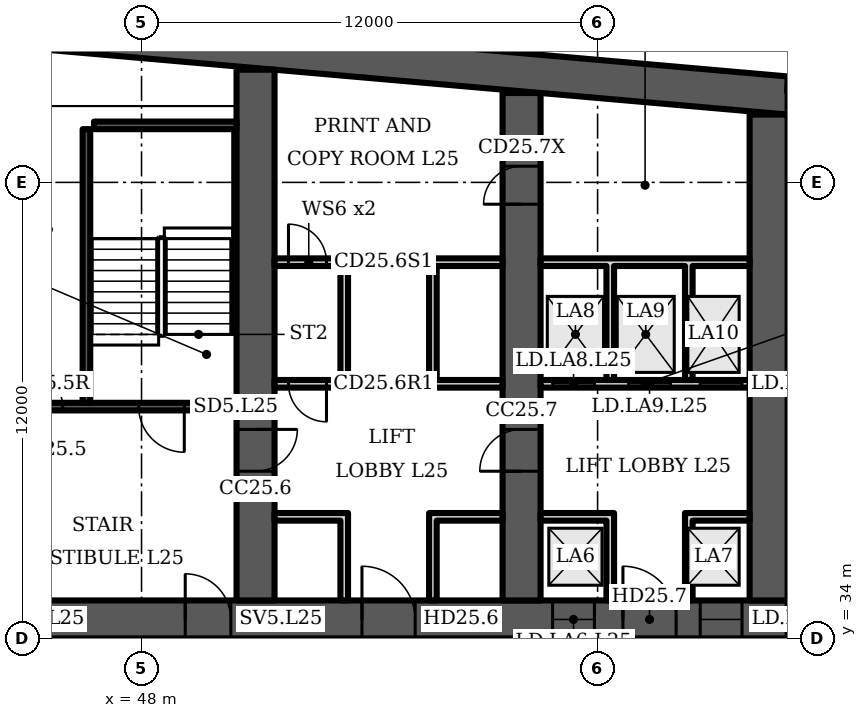
"""IFC4 building model, lengths in metres.
Left out: names, types, materials, properties, quantities, classifications, styles, units other than length and angle.
Written with IfcOpenShell. Run it as: python <this file> out.ifc"""

import sys

from ifc_helpers import new_model, si_unit, direction, frame, frame_2d, origin, place, context, subcontext, project, spatial, polyline, rectangle, outline, extrude, element, fill, save


model = new_model("IFC4")
c1 = context("Model", 3, precision=1e-05, world=origin(), true_north=direction((0.0, 1.0)))
c2 = subcontext(c1, "Body", "Model", "MODEL_VIEW")
j1 = project(units=[si_unit("LENGTHUNIT", "METRE"), si_unit("PLANEANGLEUNIT", "RADIAN")], contexts=[c1])
p1 = place(None, origin())
s1 = spatial("IfcSite", under=j1, at=p1, CompositionType="ELEMENT")
p2 = place(p1, origin())
s2 = spatial("IfcBuilding", under=s1, at=p2, CompositionType="ELEMENT")
p3 = place(p2, frame((0.0, 0.0, 111.1)))
s3 = spatial("IfcBuildingStorey", under=s2, at=p3, CompositionType="ELEMENT", Elevation=111.1)
p4 = place(p3, frame((0.0, 0.0, -0.0)))
e1 = element("IfcWall", 1, at=p4, inside=s3, PredefinedType="SHEAR", context=c2, shape_type="SweptSolid", body=[
    extrude(outline(polyline([(16.0, 47.784), (40.5, 49.927), (65.0, 47.784), (65.0, 48.787), (40.5, 50.931), (16.0, 48.787), (16.0, 47.784)])), origin(), (0.0, 0.0, 1.0), 3.6),
])
p5 = place(p3, frame((16.0, 34.5, 0.0), z_axis=(0.0, 0.0, 1.0), x_axis=(1.0, 0.0, 0.0)))
e2 = element("IfcWall", 2, at=p5, inside=s3, PredefinedType="SHEAR", context=c2, shape_type="SweptSolid", body=[
    extrude(rectangle(XDim=49.0, YDim=1.0, at=frame_2d((24.5, 0.0))), origin(), (0.0, 0.0, 1.0), 3.6),
])
p6 = place(p5, frame((1.2, 0.0, 0.0)))
e3 = element("IfcOpeningElement", 3, at=p6, cuts=e2, PredefinedType="OPENING", context=c2, shape_type="SweptSolid", body=[
    extrude(rectangle(XDim=1.1, YDim=2.1, at=frame_2d((0.55, 1.05))), frame((0.0, 0.51, 0.0), z_axis=(0.0, -1.0, 0.0), x_axis=(1.0, 0.0, 0.0)), (0.0, 0.0, 1.0), 1.02),
])
p7 = place(p5, frame((5.083, 0.0, 0.0)))
e4 = element("IfcOpeningElement", 4, at=p7, cuts=e2, PredefinedType="OPENING", context=c2, shape_type="SweptSolid", body=[
    extrude(rectangle(XDim=1.1, YDim=2.1, at=frame_2d((0.55, 1.05))), frame((0.0, 0.51, 0.0), z_axis=(0.0, -1.0, 0.0), x_axis=(1.0, 0.0, 0.0)), (0.0, 0.0, 1.0), 1.02),
])
p8 = place(p5, frame((2.933, 0.0, 0.0)))
e5 = element("IfcOpeningElement", 5, at=p8, cuts=e2, PredefinedType="OPENING", context=c2, shape_type="SweptSolid", body=[
    extrude(rectangle(XDim=1.4, YDim=2.1, at=frame_2d((0.7, 1.05))), frame((0.0, 0.51, 0.0), z_axis=(0.0, -1.0, 0.0), x_axis=(1.0, 0.0, 0.0)), (0.0, 0.0, 1.0), 1.02),
])
p9 = place(p5, frame((7.65, 0.0, 0.0)))
e6 = element("IfcOpeningElement", 6, at=p9, cuts=e2, PredefinedType="OPENING", context=c2, shape_type="SweptSolid", body=[
    extrude(rectangle(XDim=1.2, YDim=2.1, at=frame_2d((0.6, 1.05))), frame((0.0, 0.51, 0.0), z_axis=(0.0, -1.0, 0.0), x_axis=(1.0, 0.0, 0.0)), (0.0, 0.0, 1.0), 1.02),
])
p10 = place(p5, frame((14.817, 0.0, 0.0)))
e7 = element("IfcOpeningElement", 7, at=p10, cuts=e2, PredefinedType="OPENING", context=c2, shape_type="SweptSolid", body=[
    extrude(rectangle(XDim=1.1, YDim=2.1, at=frame_2d((0.55, 1.05))), frame((0.0, 0.51, 0.0), z_axis=(0.0, -1.0, 0.0), x_axis=(1.0, 0.0, 0.0)), (0.0, 0.0, 1.0), 1.02),
])
p11 = place(p5, frame((19.083, 0.0, 0.0)))
e8 = element("IfcOpeningElement", 8, at=p11, cuts=e2, PredefinedType="OPENING", context=c2, shape_type="SweptSolid", body=[
    extrude(rectangle(XDim=1.1, YDim=2.1, at=frame_2d((0.55, 1.05))), frame((0.0, 0.51, 0.0), z_axis=(0.0, -1.0, 0.0), x_axis=(1.0, 0.0, 0.0)), (0.0, 0.0, 1.0), 1.02),
])
p12 = place(p5, frame((16.8, 0.0, 0.0)))
e9 = element("IfcOpeningElement", 9, at=p12, cuts=e2, PredefinedType="OPENING", context=c2, shape_type="SweptSolid", body=[
    extrude(rectangle(XDim=1.4, YDim=2.1, at=frame_2d((0.7, 1.05))), frame((0.0, 0.51, 0.0), z_axis=(0.0, -1.0, 0.0), x_axis=(1.0, 0.0, 0.0)), (0.0, 0.0, 1.0), 1.02),
])
p13 = place(p5, frame((21.817, 0.0, 0.0)))
e10 = element("IfcOpeningElement", 10, at=p13, cuts=e2, PredefinedType="OPENING", context=c2, shape_type="SweptSolid", body=[
    extrude(rectangle(XDim=1.1, YDim=2.1, at=frame_2d((0.55, 1.05))), frame((0.0, 0.51, 0.0), z_axis=(0.0, -1.0, 0.0), x_axis=(1.0, 0.0, 0.0)), (0.0, 0.0, 1.0), 1.02),
])
p14 = place(p5, frame((26.083, 0.0, 0.0)))
e11 = element("IfcOpeningElement", 11, at=p14, cuts=e2, PredefinedType="OPENING", context=c2, shape_type="SweptSolid", body=[
    extrude(rectangle(XDim=1.1, YDim=2.1, at=frame_2d((0.55, 1.05))), frame((0.0, 0.51, 0.0), z_axis=(0.0, -1.0, 0.0), x_axis=(1.0, 0.0, 0.0)), (0.0, 0.0, 1.0), 1.02),
])
p15 = place(p5, frame((33.15, 0.0, 0.0)))
e12 = element("IfcOpeningElement", 12, at=p15, cuts=e2, PredefinedType="OPENING", context=c2, shape_type="SweptSolid", body=[
    extrude(rectangle(XDim=1.2, YDim=2.1, at=frame_2d((0.6, 1.05))), frame((0.0, 0.51, 0.0), z_axis=(0.0, -1.0, 0.0), x_axis=(1.0, 0.0, 0.0)), (0.0, 0.0, 1.0), 1.02),
])
p16 = place(p5, frame((37.8, 0.0, 0.0)))
e13 = element("IfcOpeningElement", 13, at=p16, cuts=e2, PredefinedType="OPENING", context=c2, shape_type="SweptSolid", body=[
    extrude(rectangle(XDim=1.4, YDim=2.1, at=frame_2d((0.7, 1.05))), frame((0.0, 0.51, 0.0), z_axis=(0.0, -1.0, 0.0), x_axis=(1.0, 0.0, 0.0)), (0.0, 0.0, 1.0), 1.02),
])
p17 = place(p5, frame((42.817, 0.0, 0.0)))
e14 = element("IfcOpeningElement", 14, at=p17, cuts=e2, PredefinedType="OPENING", context=c2, shape_type="SweptSolid", body=[
    extrude(rectangle(XDim=1.1, YDim=2.1, at=frame_2d((0.55, 1.05))), frame((0.0, 0.51, 0.0), z_axis=(0.0, -1.0, 0.0), x_axis=(1.0, 0.0, 0.0)), (0.0, 0.0, 1.0), 1.02),
])
p18 = place(p5, frame((46.7, 0.0, 0.0)))
e15 = element("IfcOpeningElement", 15, at=p18, cuts=e2, PredefinedType="OPENING", context=c2, shape_type="SweptSolid", body=[
    extrude(rectangle(XDim=1.1, YDim=2.1, at=frame_2d((0.55, 1.05))), frame((0.0, 0.51, 0.0), z_axis=(0.0, -1.0, 0.0), x_axis=(1.0, 0.0, 0.0)), (0.0, 0.0, 1.0), 1.02),
])
p19 = place(p5, frame((44.667, 0.0, 0.0)))
e16 = element("IfcOpeningElement", 16, at=p19, cuts=e2, PredefinedType="OPENING", context=c2, shape_type="SweptSolid", body=[
    extrude(rectangle(XDim=1.4, YDim=2.1, at=frame_2d((0.7, 1.05))), frame((0.0, 0.51, 0.0), z_axis=(0.0, -1.0, 0.0), x_axis=(1.0, 0.0, 0.0)), (0.0, 0.0, 1.0), 1.02),
])
p20 = place(p3, frame((51.0, 35.0, 0.0), z_axis=(0.0, 0.0, 1.0), x_axis=(0.0, 1.0, 0.0)))
e17 = element("IfcWall", 17, at=p20, inside=s3, PredefinedType="SHEAR", context=c2, shape_type="SweptSolid", body=[
    extrude(rectangle(XDim=13.965, YDim=1.0, at=frame_2d((6.982, 0.0))), origin(), (0.0, 0.0, 1.0), 3.6),
])
p21 = place(p20, frame((3.4, 0.0, 0.0)))
e18 = element("IfcOpeningElement", 18, at=p21, cuts=e17, PredefinedType="OPENING", context=c2, shape_type="SweptSolid", body=[
    extrude(rectangle(XDim=1.1, YDim=2.1, at=frame_2d((0.55, 1.05))), frame((0.0, 0.51, 0.0), z_axis=(0.0, -1.0, 0.0), x_axis=(1.0, 0.0, 0.0)), (0.0, 0.0, 1.0), 1.02),
])
p22 = place(p3, frame((58.0, 35.0, 0.0), z_axis=(0.0, 0.0, 1.0), x_axis=(0.0, 1.0, 0.0)))
e19 = element("IfcWall", 19, at=p22, inside=s3, PredefinedType="SHEAR", context=c2, shape_type="SweptSolid", body=[
    extrude(rectangle(XDim=13.352, YDim=1.0, at=frame_2d((6.676, 0.0))), origin(), (0.0, 0.0, 1.0), 3.6),
])
p23 = place(p22, frame((10.426, 0.0, 0.0)))
e20 = element("IfcOpeningElement", 20, at=p23, cuts=e19, PredefinedType="OPENING", context=c2, shape_type="SweptSolid", body=[
    extrude(rectangle(XDim=1.0, YDim=2.1, at=frame_2d((0.5, 1.05))), frame((0.0, 0.51, 0.0), z_axis=(0.0, -1.0, 0.0), x_axis=(1.0, 0.0, 0.0)), (0.0, 0.0, 1.0), 1.02),
])
p24 = place(p22, frame((3.4, 0.0, 0.0)))
e21 = element("IfcOpeningElement", 21, at=p24, cuts=e19, PredefinedType="OPENING", context=c2, shape_type="SweptSolid", body=[
    extrude(rectangle(XDim=1.1, YDim=2.1, at=frame_2d((0.55, 1.05))), frame((0.0, 0.51, 0.0), z_axis=(0.0, -1.0, 0.0), x_axis=(1.0, 0.0, 0.0)), (0.0, 0.0, 1.0), 1.02),
])
p25 = place(p3, frame((64.5, 35.0, 0.0), z_axis=(0.0, 0.0, 1.0), x_axis=(0.0, 1.0, 0.0)))
e22 = element("IfcWall", 22, at=p25, inside=s3, PredefinedType="SHEAR", context=c2, shape_type="SweptSolid", body=[
    extrude(rectangle(XDim=12.784, YDim=1.0, at=frame_2d((6.392, 0.0))), origin(), (0.0, 0.0, 1.0), 3.6),
])
p26 = place(p3, frame((67.983, 48.326, 0.0), z_axis=(0.0, 0.0, 1.0), x_axis=(-0.996194, 0.087168, 0.0)))
e23 = element("IfcWall", 23, at=p26, inside=s3, PredefinedType="SOLIDWALL", context=c2, shape_type="SweptSolid", body=[
    extrude(rectangle(XDim=2.994, YDim=0.4, at=frame_2d((1.497, 0.0))), origin(), (0.0, 0.0, 1.0), 3.2),
])
p27 = place(p3, frame((44.5, 40.1, 0.0), z_axis=(0.0, 0.0, 1.0), x_axis=(1.0, 0.0, 0.0)))
e24 = element("IfcWall", 24, at=p27, inside=s3, PredefinedType="SHEAR", context=c2, shape_type="SweptSolid", body=[
    extrude(rectangle(XDim=6.0, YDim=0.2, at=frame_2d((3.0, 0.0))), origin(), (0.0, 0.0, 1.0), 3.2),
])
p28 = place(p27, frame((3.425, 0.0, 0.0)))
e25 = element("IfcOpeningElement", 25, at=p28, cuts=e24, PredefinedType="OPENING", context=c2, shape_type="SweptSolid", body=[
    extrude(rectangle(XDim=1.2, YDim=2.1, at=frame_2d((0.6, 1.05))), frame((0.0, 0.11, 0.0), z_axis=(0.0, -1.0, 0.0), x_axis=(1.0, 0.0, 0.0)), (0.0, 0.0, 1.0), 0.22),
])
p29 = place(p27, frame((0.525, 0.0, 0.0)))
e26 = element("IfcOpeningElement", 26, at=p29, cuts=e24, PredefinedType="OPENING", context=c2, shape_type="SweptSolid", body=[
    extrude(rectangle(XDim=0.9, YDim=2.1, at=frame_2d((0.45, 1.05))), frame((0.0, 0.11, 0.0), z_axis=(0.0, -1.0, 0.0), x_axis=(1.0, 0.0, 0.0)), (0.0, 0.0, 1.0), 0.22),
])
p30 = place(p3, frame((46.55, 40.2, 0.0), z_axis=(0.0, 0.0, 1.0), x_axis=(0.0, 1.0, 0.0)))
e27 = element("IfcWall", 27, at=p30, inside=s3, PredefinedType="SHEAR", context=c2, shape_type="SweptSolid", body=[
    extrude(rectangle(XDim=7.2, YDim=0.2, at=frame_2d((3.6, 0.0))), origin(), (0.0, 0.0, 1.0), 3.2),
])
p31 = place(p3, frame((46.75, 47.5, 0.0), z_axis=(0.0, 0.0, 1.0), x_axis=(1.0, 0.0, 0.0)))
e28 = element("IfcWall", 28, at=p31, inside=s3, PredefinedType="SHEAR", context=c2, shape_type="SweptSolid", body=[
    extrude(rectangle(XDim=3.75, YDim=0.2, at=frame_2d((1.875, 0.0))), origin(), (0.0, 0.0, 1.0), 3.2),
])
p32 = place(p3, frame((51.5, 40.7, 0.0), z_axis=(0.0, 0.0, 1.0), x_axis=(1.0, 0.0, 0.0)))
e29 = element("IfcWall", 29, at=p32, inside=s3, PredefinedType="PARTITIONING", context=c2, shape_type="SweptSolid", body=[
    extrude(rectangle(XDim=6.0, YDim=0.2, at=frame_2d((3.0, 0.0))), origin(), (0.0, 0.0, 1.0), 3.2),
])
p33 = place(p32, frame((0.367, 0.0, 0.0)))
e30 = element("IfcOpeningElement", 30, at=p33, cuts=e29, PredefinedType="OPENING", context=c2, shape_type="SweptSolid", body=[
    extrude(rectangle(XDim=1.0, YDim=2.1, at=frame_2d((0.5, 1.05))), frame((0.0, 0.11, 0.0), z_axis=(0.0, -1.0, 0.0), x_axis=(1.0, 0.0, 0.0)), (0.0, 0.0, 1.0), 0.22),
])
p34 = place(p3, frame((51.5, 43.9, 0.0), z_axis=(0.0, 0.0, 1.0), x_axis=(1.0, 0.0, 0.0)))
e31 = element("IfcWall", 31, at=p34, inside=s3, PredefinedType="PARTITIONING", context=c2, shape_type="SweptSolid", body=[
    extrude(rectangle(XDim=6.0, YDim=0.2, at=frame_2d((3.0, 0.0))), origin(), (0.0, 0.0, 1.0), 3.2),
])
p35 = place(p34, frame((0.367, 0.0, 0.0)))
e32 = element("IfcOpeningElement", 32, at=p35, cuts=e31, PredefinedType="OPENING", context=c2, shape_type="SweptSolid", body=[
    extrude(rectangle(XDim=1.0, YDim=2.1, at=frame_2d((0.5, 1.05))), frame((0.0, 0.11, 0.0), z_axis=(0.0, -1.0, 0.0), x_axis=(1.0, 0.0, 0.0)), (0.0, 0.0, 1.0), 0.22),
])
p36 = place(p3, frame((0.0, 0.0, -0.0)))
e33 = element("IfcWall", 33, at=p36, inside=s3, PredefinedType="PARTITIONING", context=c2, shape_type="SweptSolid", body=[
    extrude(outline(polyline([(53.233, 37.1), (51.5, 37.1), (51.5, 37.3), (53.233, 37.3), (53.433, 37.3), (53.433, 35.0), (53.233, 35.0), (53.233, 37.1)])), origin(), (0.0, 0.0, 1.0), 3.2),
])
p37 = place(p3, frame((0.0, 0.0, -0.0)))
e34 = element("IfcWall", 34, at=p37, inside=s3, PredefinedType="PARTITIONING", context=c2, shape_type="SweptSolid", body=[
    extrude(outline(polyline([(55.567, 37.3), (55.767, 37.3), (57.5, 37.3), (57.5, 37.1), (55.767, 37.1), (55.767, 35.0), (55.567, 35.0), (55.567, 37.3)])), origin(), (0.0, 0.0, 1.0), 3.2),
])
p38 = place(p3, frame((0.0, 0.0, -0.0)))
e35 = element("IfcWall", 35, at=p38, inside=s3, PredefinedType="PARTITIONING", context=c2, shape_type="SweptSolid", body=[
    extrude(outline(polyline([(53.233, 40.8), (53.233, 43.8), (53.433, 43.8), (53.433, 40.8), (53.233, 40.8)])), origin(), (0.0, 0.0, 1.0), 3.2),
])
p39 = place(p3, frame((0.0, 0.0, -0.0)))
e36 = element("IfcWall", 36, at=p39, inside=s3, PredefinedType="PARTITIONING", context=c2, shape_type="SweptSolid", body=[
    extrude(outline(polyline([(55.567, 40.8), (55.567, 43.8), (55.767, 43.8), (55.767, 40.8), (55.567, 40.8)])), origin(), (0.0, 0.0, 1.0), 3.2),
])
p40 = place(p3, frame((58.5, 40.7, 0.0), z_axis=(0.0, 0.0, 1.0), x_axis=(1.0, 0.0, 0.0)))
e37 = element("IfcWall", 37, at=p40, inside=s3, PredefinedType="PARTITIONING", context=c2, shape_type="SweptSolid", body=[
    extrude(rectangle(XDim=5.5, YDim=0.2, at=frame_2d((2.75, 0.0))), origin(), (0.0, 0.0, 1.0), 3.2),
])
p41 = place(p40, frame((0.317, 0.0, 0.0)))
e38 = element("IfcOpeningElement", 38, at=p41, cuts=e37, PredefinedType="OPENING", context=c2, shape_type="SweptSolid", body=[
    extrude(rectangle(XDim=1.1, YDim=2.1, at=frame_2d((0.55, 1.05))), frame((0.0, 0.11, 0.0), z_axis=(0.0, -1.0, 0.0), x_axis=(1.0, 0.0, 0.0)), (0.0, 0.0, 1.0), 0.22),
])
p42 = place(p40, frame((2.317, 0.0, 0.0)))
e39 = element("IfcOpeningElement", 39, at=p42, cuts=e37, PredefinedType="OPENING", context=c2, shape_type="SweptSolid", body=[
    extrude(rectangle(XDim=1.1, YDim=2.1, at=frame_2d((0.55, 1.05))), frame((0.0, 0.11, 0.0), z_axis=(0.0, -1.0, 0.0), x_axis=(1.0, 0.0, 0.0)), (0.0, 0.0, 1.0), 0.22),
])
p43 = place(p40, frame((4.2, 0.0, 0.0)))
e40 = element("IfcOpeningElement", 40, at=p43, cuts=e37, PredefinedType="OPENING", context=c2, shape_type="SweptSolid", body=[
    extrude(rectangle(XDim=1.1, YDim=2.1, at=frame_2d((0.55, 1.05))), frame((0.0, 0.11, 0.0), z_axis=(0.0, -1.0, 0.0), x_axis=(1.0, 0.0, 0.0)), (0.0, 0.0, 1.0), 0.22),
])
p44 = place(p3, frame((0.0, 0.0, -0.0)))
e41 = element("IfcWall", 41, at=p44, inside=s3, PredefinedType="PARTITIONING", context=c2, shape_type="SweptSolid", body=[
    extrude(outline(polyline([(60.233, 37.1), (58.5, 37.1), (58.5, 37.3), (60.233, 37.3), (60.433, 37.3), (60.433, 35.0), (60.233, 35.0), (60.233, 37.1)])), origin(), (0.0, 0.0, 1.0), 3.2),
])
p45 = place(p3, frame((0.0, 0.0, -0.0)))
e42 = element("IfcWall", 42, at=p45, inside=s3, PredefinedType="PARTITIONING", context=c2, shape_type="SweptSolid", body=[
    extrude(outline(polyline([(62.3, 37.3), (62.5, 37.3), (64.0, 37.3), (64.0, 37.1), (62.5, 37.1), (62.5, 35.0), (62.3, 35.0), (62.3, 37.3)])), origin(), (0.0, 0.0, 1.0), 3.2),
])
p46 = place(p3, frame((0.0, 0.0, -0.0)))
e43 = element("IfcWall", 43, at=p46, inside=s3, PredefinedType="PARTITIONING", context=c2, shape_type="SweptSolid", body=[
    extrude(outline(polyline([(60.433, 40.8), (60.233, 40.8), (60.233, 43.8), (58.5, 43.8), (58.5, 44.0), (64.0, 44.0), (64.0, 43.8), (62.5, 43.8), (62.5, 40.8), (62.3, 40.8), (62.3, 43.8), (60.433, 43.8), (60.433, 40.8)])), origin(), (0.0, 0.0, 1.0), 3.2),
])
p47 = place(p28, origin())
e44 = element("IfcDoor", 44, at=p47, inside=s3, OperationType="SINGLE_SWING_RIGHT", PredefinedType="DOOR", context=c2, shape_type="SweptSolid", body=[
    extrude(rectangle(XDim=1.2, YDim=2.1, at=frame_2d((0.6, 1.05))), frame((0.0, 0.025, 0.0), z_axis=(0.0, -1.0, 0.0), x_axis=(1.0, 0.0, 0.0)), (0.0, 0.0, 1.0), 0.05),
])
fill(e25, e44)
p48 = place(p29, origin())
e45 = element("IfcDoor", 45, at=p48, inside=s3, OperationType="SINGLE_SWING_LEFT", PredefinedType="DOOR", context=c2, shape_type="SweptSolid", body=[
    extrude(rectangle(XDim=0.9, YDim=2.1, at=frame_2d((0.45, 1.05))), frame((0.0, 0.025, 0.0), z_axis=(0.0, -1.0, 0.0), x_axis=(1.0, 0.0, 0.0)), (0.0, 0.0, 1.0), 0.05),
])
fill(e26, e45)
p49 = place(p15, origin())
e46 = element("IfcDoor", 46, at=p49, inside=s3, OperationType="SINGLE_SWING_LEFT", PredefinedType="DOOR", context=c2, shape_type="SweptSolid", body=[
    extrude(rectangle(XDim=1.2, YDim=2.1, at=frame_2d((0.6, 1.05))), frame((0.0, 0.025, 0.0), z_axis=(0.0, -1.0, 0.0), x_axis=(1.0, 0.0, 0.0)), (0.0, 0.0, 1.0), 0.05),
])
fill(e12, e46)
p50 = place(p16, origin())
e47 = element("IfcDoor", 47, at=p50, inside=s3, OperationType="DOUBLE_DOOR_SINGLE_SWING", PredefinedType="DOOR", context=c2, shape_type="SweptSolid", body=[
    extrude(rectangle(XDim=1.4, YDim=2.1, at=frame_2d((0.7, 1.05))), frame((0.0, 0.025, 0.0), z_axis=(0.0, -1.0, 0.0), x_axis=(1.0, 0.0, 0.0)), (0.0, 0.0, 1.0), 0.05),
])
fill(e13, e47)
p51 = place(p33, origin())
e48 = element("IfcDoor", 48, at=p51, inside=s3, OperationType="SINGLE_SWING_RIGHT", PredefinedType="DOOR", context=c2, shape_type="SweptSolid", body=[
    extrude(rectangle(XDim=1.0, YDim=2.1, at=frame_2d((0.5, 1.05))), frame((0.0, 0.025, 0.0), z_axis=(0.0, -1.0, 0.0), x_axis=(1.0, 0.0, 0.0)), (0.0, 0.0, 1.0), 0.05),
])
fill(e30, e48)
p52 = place(p35, origin())
e49 = element("IfcDoor", 49, at=p52, inside=s3, OperationType="SINGLE_SWING_LEFT", PredefinedType="DOOR", context=c2, shape_type="SweptSolid", body=[
    extrude(rectangle(XDim=1.0, YDim=2.1, at=frame_2d((0.5, 1.05))), frame((0.0, 0.025, 0.0), z_axis=(0.0, -1.0, 0.0), x_axis=(1.0, 0.0, 0.0)), (0.0, 0.0, 1.0), 0.05),
])
fill(e32, e49)
p53 = place(p17, origin())
e50 = element("IfcDoor", 50, at=p53, inside=s3, OperationType="DOUBLE_DOOR_SLIDING", PredefinedType="DOOR", context=c2, shape_type="SweptSolid", body=[
    extrude(rectangle(XDim=1.1, YDim=2.1, at=frame_2d((0.55, 1.05))), frame((0.0, 0.025, 0.0), z_axis=(0.0, -1.0, 0.0), x_axis=(1.0, 0.0, 0.0)), (0.0, 0.0, 1.0), 0.05),
])
fill(e14, e50)
p54 = place(p18, origin())
e51 = element("IfcDoor", 51, at=p54, inside=s3, OperationType="DOUBLE_DOOR_SLIDING", PredefinedType="DOOR", context=c2, shape_type="SweptSolid", body=[
    extrude(rectangle(XDim=1.1, YDim=2.1, at=frame_2d((0.55, 1.05))), frame((0.0, 0.025, 0.0), z_axis=(0.0, -1.0, 0.0), x_axis=(1.0, 0.0, 0.0)), (0.0, 0.0, 1.0), 0.05),
])
fill(e15, e51)
p55 = place(p19, origin())
e52 = element("IfcDoor", 52, at=p55, inside=s3, OperationType="DOUBLE_DOOR_SINGLE_SWING", PredefinedType="DOOR", context=c2, shape_type="SweptSolid", body=[
    extrude(rectangle(XDim=1.4, YDim=2.1, at=frame_2d((0.7, 1.05))), frame((0.0, 0.025, 0.0), z_axis=(0.0, -1.0, 0.0), x_axis=(1.0, 0.0, 0.0)), (0.0, 0.0, 1.0), 0.05),
])
fill(e16, e52)
p56 = place(p41, origin())
e53 = element("IfcDoor", 53, at=p56, inside=s3, OperationType="DOUBLE_DOOR_SLIDING", PredefinedType="DOOR", context=c2, shape_type="SweptSolid", body=[
    extrude(rectangle(XDim=1.1, YDim=2.1, at=frame_2d((0.55, 1.05))), frame((0.0, 0.025, 0.0), z_axis=(0.0, -1.0, 0.0), x_axis=(1.0, 0.0, 0.0)), (0.0, 0.0, 1.0), 0.05),
])
fill(e38, e53)
p57 = place(p42, origin())
e54 = element("IfcDoor", 54, at=p57, inside=s3, OperationType="DOUBLE_DOOR_SLIDING", PredefinedType="DOOR", context=c2, shape_type="SweptSolid", body=[
    extrude(rectangle(XDim=1.1, YDim=2.1, at=frame_2d((0.55, 1.05))), frame((0.0, 0.025, 0.0), z_axis=(0.0, -1.0, 0.0), x_axis=(1.0, 0.0, 0.0)), (0.0, 0.0, 1.0), 0.05),
])
fill(e39, e54)
p58 = place(p43, origin())
e55 = element("IfcDoor", 55, at=p58, inside=s3, OperationType="DOUBLE_DOOR_SLIDING", PredefinedType="DOOR", context=c2, shape_type="SweptSolid", body=[
    extrude(rectangle(XDim=1.1, YDim=2.1, at=frame_2d((0.55, 1.05))), frame((0.0, 0.025, 0.0), z_axis=(0.0, -1.0, 0.0), x_axis=(1.0, 0.0, 0.0)), (0.0, 0.0, 1.0), 0.05),
])
fill(e40, e55)
p59 = place(p23, origin())
e56 = element("IfcDoor", 56, at=p59, inside=s3, OperationType="SINGLE_SWING_LEFT", PredefinedType="DOOR", context=c2, shape_type="SweptSolid", body=[
    extrude(rectangle(XDim=1.0, YDim=2.1, at=frame_2d((0.5, 1.05))), frame((0.0, 0.5, 0.0), z_axis=(0.0, -1.0, 0.0), x_axis=(1.0, 0.0, 0.0)), (0.0, 0.0, 1.0), 1.0),
])
fill(e20, e56)
p60 = place(p21, origin())
e57 = element("IfcDoor", 57, at=p60, inside=s3, OperationType="SINGLE_SWING_RIGHT", PredefinedType="DOOR", context=c2, shape_type="SweptSolid", body=[
    extrude(rectangle(XDim=1.1, YDim=2.1, at=frame_2d((0.55, 1.05))), frame((0.0, 0.025, 0.0), z_axis=(0.0, -1.0, 0.0), x_axis=(1.0, 0.0, 0.0)), (0.0, 0.0, 1.0), 0.05),
])
fill(e18, e57)
p61 = place(p24, origin())
e58 = element("IfcDoor", 58, at=p61, inside=s3, OperationType="SINGLE_SWING_LEFT", PredefinedType="DOOR", context=c2, shape_type="SweptSolid", body=[
    extrude(rectangle(XDim=1.1, YDim=2.1, at=frame_2d((0.55, 1.05))), frame((0.0, 0.025, 0.0), z_axis=(0.0, -1.0, 0.0), x_axis=(1.0, 0.0, 0.0)), (0.0, 0.0, 1.0), 0.05),
])
fill(e21, e58)
save(model, sys.argv[1])
